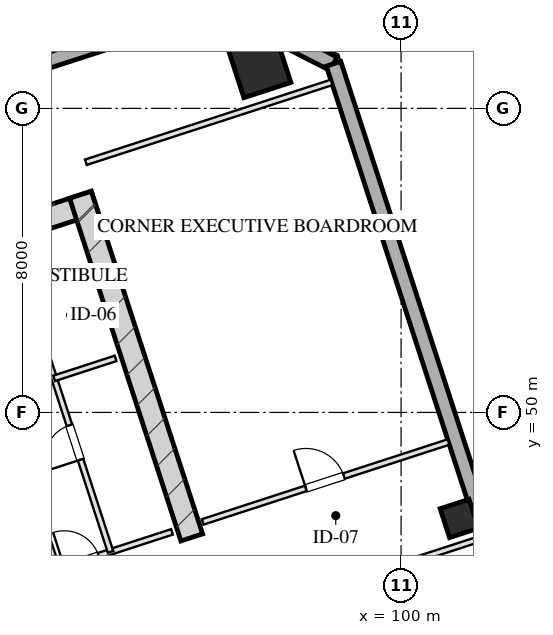
"""IFC4 building model, lengths in metres.
Left out: names, types, materials, properties, quantities, classifications, styles, units other than length and angle.
Written with IfcOpenShell. Run it as: python <this file> out.ifc"""

import sys

from ifc_helpers import new_model, si_unit, direction, frame, frame_2d, origin, origin_2d, place, context, subcontext, project, spatial, rectangle, hollow_rectangle, extrude, element, fill, save


model = new_model("IFC4")
c1 = context("Model", 3, precision=1e-05, world=origin(), true_north=direction((0.0, 1.0)))
c2 = subcontext(c1, "Body", "Model", "MODEL_VIEW")
j1 = project(units=[si_unit("LENGTHUNIT", "METRE"), si_unit("PLANEANGLEUNIT", "RADIAN")], contexts=[c1])
p1 = place(None, origin())
s1 = spatial("IfcSite", under=j1, at=p1, CompositionType="ELEMENT")
p2 = place(p1, origin())
s2 = spatial("IfcBuilding", under=s1, at=p2, CompositionType="ELEMENT")
p3 = place(p2, frame((0.0, 0.0, 170.2)))
s3 = spatial("IfcBuildingStorey", under=s2, at=p3, CompositionType="ELEMENT", Elevation=170.2)
p4 = place(p3, frame((76.344, 50.466, 0.0), z_axis=(0.0, 0.0, 1.0), x_axis=(0.951055727519, 0.309019421968, 0.0)))
e1 = element("IfcWall", 1, at=p4, inside=s3, PredefinedType="SHEAR", context=c2, shape_type="SweptSolid", body=[
    extrude(rectangle(XDim=16.4, YDim=0.6, at=frame_2d((8.2, 0.0))), origin(), (0.0, 0.0, 1.0), 3.45),
])
p5 = place(p3, frame((94.492, 46.71, 0.0), z_axis=(0.0, 0.0, 1.0), x_axis=(-0.309010370028, 0.95105866865, 0.0)))
e2 = element("IfcWall", 2, at=p5, inside=s3, PredefinedType="SHEAR", context=c2, shape_type="SweptSolid", body=[
    extrude(rectangle(XDim=9.48, YDim=0.6, at=frame_2d((4.74, 0.0))), origin(), (0.0, 0.0, 1.0), 3.45),
])
p6 = place(p3, frame((96.281, 59.099, 0.0), z_axis=(0.0, 0.0, 1.0), x_axis=(0.951056516295, 0.309016994375, 0.0)))
e3 = element("IfcColumn", 3, at=p6, inside=s3, PredefinedType="COLUMN", context=c2, shape_type="SweptSolid", body=[
    extrude(hollow_rectangle(XDim=1.3, YDim=1.3, WallThickness=0.045, at=origin_2d()), origin(), (0.0, 0.0, 1.0), 3.451),
])
p7 = place(p3, frame((101.532, 47.21, 0.0), z_axis=(0.0, 0.0, 1.0), x_axis=(0.951056516295, 0.309016994375, 0.0)))
e4 = element("IfcColumn", 4, at=p7, inside=s3, PredefinedType="COLUMN", context=c2, shape_type="SweptSolid", body=[
    extrude(hollow_rectangle(XDim=0.8, YDim=0.8, WallThickness=0.028, at=origin_2d()), origin(), (0.0, 0.0, 1.0), 3.451),
])
p8 = place(p3, frame((70.092, 52.556, 0.0), z_axis=(0.0, 0.0, 1.0), x_axis=(0.951057580055, 0.30901372044, 0.0)))
e5 = element("IfcWall", 5, at=p8, inside=s3, PredefinedType="SOLIDWALL", context=c2, shape_type="SweptSolid", body=[
    extrude(rectangle(XDim=26.4, YDim=0.4, at=frame_2d((13.2, 0.0))), origin(), (0.0, 0.0, 1.0), 2.61),
])
p9 = place(p3, frame((95.199, 60.714, 0.0), z_axis=(0.0, 0.0, 1.0), x_axis=(0.891020832027, -0.453962417932, 0.0)))
e6 = element("IfcWall", 6, at=p9, inside=s3, PredefinedType="SOLIDWALL", context=c2, shape_type="SweptSolid", body=[
    extrude(rectangle(XDim=3.394, YDim=0.4, at=frame_2d((1.697, 0.0))), origin(), (0.0, 0.0, 1.0), 2.61),
])
p10 = place(p3, frame((98.224, 59.173, 0.0), z_axis=(0.0, 0.0, 1.0), x_axis=(0.309014228706, -0.951057414911, 0.0)))
e7 = element("IfcWall", 7, at=p10, inside=s3, PredefinedType="SOLIDWALL", context=c2, shape_type="SweptSolid", body=[
    extrude(rectangle(XDim=42.8, YDim=0.4, at=frame_2d((21.4, 0.0))), origin(), (0.0, 0.0, 1.0), 2.61),
])
p11 = place(p10, frame((26.675, 0.0, 0.75)))
e8 = element("IfcOpeningElement", 8, at=p11, cuts=e7, PredefinedType="OPENING", context=c2, shape_type="SweptSolid", body=[
    extrude(rectangle(XDim=2.25, YDim=1.46, at=frame_2d((1.125, 0.73))), frame((0.0, 0.21, 0.0), z_axis=(0.0, -1.0, 0.0), x_axis=(1.0, 0.0, 0.0)), (0.0, 0.0, 1.0), 0.42),
])
p12 = place(p10, frame((22.875, 0.0, 0.75)))
e9 = element("IfcOpeningElement", 9, at=p12, cuts=e7, PredefinedType="OPENING", context=c2, shape_type="SweptSolid", body=[
    extrude(rectangle(XDim=2.25, YDim=1.46, at=frame_2d((1.125, 0.73))), frame((0.0, 0.21, 0.0), z_axis=(0.0, -1.0, 0.0), x_axis=(1.0, 0.0, 0.0)), (0.0, 0.0, 1.0), 0.42),
])
p13 = place(p10, frame((17.675, 0.0, 0.75)))
e10 = element("IfcOpeningElement", 10, at=p13, cuts=e7, PredefinedType="OPENING", context=c2, shape_type="SweptSolid", body=[
    extrude(rectangle(XDim=2.25, YDim=1.46, at=frame_2d((1.125, 0.73))), frame((0.0, 0.21, 0.0), z_axis=(0.0, -1.0, 0.0), x_axis=(1.0, 0.0, 0.0)), (0.0, 0.0, 1.0), 0.42),
])
p14 = place(p10, frame((13.875, 0.0, 0.75)))
e11 = element("IfcOpeningElement", 11, at=p14, cuts=e7, PredefinedType="OPENING", context=c2, shape_type="SweptSolid", body=[
    extrude(rectangle(XDim=2.25, YDim=1.46, at=frame_2d((1.125, 0.73))), frame((0.0, 0.21, 0.0), z_axis=(0.0, -1.0, 0.0), x_axis=(1.0, 0.0, 0.0)), (0.0, 0.0, 1.0), 0.42),
])
p15 = place(p3, frame((90.928, 45.868, 0.0), z_axis=(0.0, 0.0, 1.0), x_axis=(-0.309042196757, 0.951048327176, 0.0)))
e12 = element("IfcWall", 12, at=p15, inside=s3, PredefinedType="PARTITIONING", context=c2, shape_type="SweptSolid", body=[
    extrude(rectangle(XDim=8.43, YDim=0.2, at=frame_2d((4.215, 0.0))), origin(), (0.0, 0.0, 1.0), 3.175),
])
p16 = place(p3, frame((90.928, 45.868, 0.0), z_axis=(0.0, 0.0, 1.0), x_axis=(0.951059297078, 0.309008435874, 0.0)))
e13 = element("IfcWall", 13, at=p16, inside=s3, PredefinedType="PARTITIONING", context=c2, shape_type="SweptSolid", body=[
    extrude(rectangle(XDim=3.2, YDim=0.15, at=frame_2d((1.6, 0.0))), origin(), (0.0, 0.0, 1.0), 3.175),
])
p17 = place(p16, frame((0.22, 0.0, 0.0)))
e14 = element("IfcOpeningElement", 14, at=p17, cuts=e13, PredefinedType="OPENING", context=c2, shape_type="SweptSolid", body=[
    extrude(rectangle(XDim=0.95, YDim=2.05, at=frame_2d((0.475, 1.025))), frame((0.0, 0.085, 0.0), z_axis=(0.0, -1.0, 0.0), x_axis=(1.0, 0.0, 0.0)), (0.0, 0.0, 1.0), 0.17),
])
p18 = place(p3, frame((92.355, 46.331, 0.0), z_axis=(0.0, 0.0, 1.0), x_axis=(-0.309007490203, 0.951059604335, 0.0)))
e15 = element("IfcWall", 15, at=p18, inside=s3, PredefinedType="PARTITIONING", context=c2, shape_type="SweptSolid", body=[
    extrude(rectangle(XDim=8.43, YDim=0.15, at=frame_2d((4.215, 0.0))), origin(), (0.0, 0.0, 1.0), 3.175),
])
p19 = place(p18, frame((2.55, 0.0, 0.0)))
e16 = element("IfcOpeningElement", 16, at=p19, cuts=e15, PredefinedType="OPENING", context=c2, shape_type="SweptSolid", body=[
    extrude(rectangle(XDim=0.95, YDim=2.05, at=frame_2d((0.475, 1.025))), frame((0.0, 0.085, 0.0), z_axis=(0.0, -1.0, 0.0), x_axis=(1.0, 0.0, 0.0)), (0.0, 0.0, 1.0), 0.17),
])
p20 = place(p18, frame((5.8, 0.0, 0.0)))
e17 = element("IfcOpeningElement", 17, at=p20, cuts=e15, PredefinedType="OPENING", context=c2, shape_type="SweptSolid", body=[
    extrude(rectangle(XDim=0.9, YDim=2.05, at=frame_2d((0.45, 1.025))), frame((0.0, 0.085, 0.0), z_axis=(0.0, -1.0, 0.0), x_axis=(1.0, 0.0, 0.0)), (0.0, 0.0, 1.0), 0.17),
])
p21 = place(p3, frame((90.871, 50.896, 0.0), z_axis=(0.0, 0.0, 1.0), x_axis=(0.951054116971, 0.309024378638, 0.0)))
e18 = element("IfcWall", 18, at=p21, inside=s3, PredefinedType="PARTITIONING", context=c2, shape_type="SweptSolid", body=[
    extrude(rectangle(XDim=1.7, YDim=0.15, at=frame_2d((0.85, 0.0))), origin(), (0.0, 0.0, 1.0), 3.175),
])
p22 = place(p3, frame((91.705, 56.582, 0.0), z_axis=(0.0, 0.0, 1.0), x_axis=(0.951057811516, 0.309013008068, 0.0)))
e19 = element("IfcWall", 19, at=p22, inside=s3, PredefinedType="PARTITIONING", context=c2, shape_type="SweptSolid", body=[
    extrude(rectangle(XDim=6.8, YDim=0.15, at=frame_2d((3.4, 0.0))), origin(), (0.0, 0.0, 1.0), 3.175),
])
p23 = place(p3, frame((94.78, 47.119, 0.0), z_axis=(0.0, 0.0, 1.0), x_axis=(0.951057811516, 0.309013008068, 0.0)))
e20 = element("IfcWall", 20, at=p23, inside=s3, PredefinedType="PARTITIONING", context=c2, shape_type="SweptSolid", body=[
    extrude(rectangle(XDim=6.8, YDim=0.15, at=frame_2d((3.4, 0.0))), origin(), (0.0, 0.0, 1.0), 3.175),
])
p24 = place(p23, frame((2.856, 0.0, 0.0)))
e21 = element("IfcOpeningElement", 21, at=p24, cuts=e20, PredefinedType="OPENING", context=c2, shape_type="SweptSolid", body=[
    extrude(rectangle(XDim=1.05, YDim=2.05, at=frame_2d((0.525, 1.025))), frame((0.0, 0.085, 0.0), z_axis=(0.0, -1.0, 0.0), x_axis=(1.0, 0.0, 0.0)), (0.0, 0.0, 1.0), 0.17),
])
p25 = place(p3, frame((91.138, 43.118, 0.0), z_axis=(0.0, 0.0, 1.0), x_axis=(0.951054972381, 0.309021746015, 0.0)))
e22 = element("IfcWall", 22, at=p25, inside=s3, PredefinedType="PARTITIONING", context=c2, shape_type="SweptSolid", body=[
    extrude(rectangle(XDim=11.5, YDim=0.15, at=frame_2d((5.75, 0.0))), origin(), (0.0, 0.0, 1.0), 3.175),
])
p26 = place(p17, origin())
e23 = element("IfcDoor", 23, at=p26, inside=s3, OperationType="SINGLE_SWING_LEFT", PredefinedType="DOOR", context=c2, shape_type="SweptSolid", body=[
    extrude(rectangle(XDim=0.95, YDim=2.05, at=frame_2d((0.475, 1.025))), frame((0.0, 0.025, 0.0), z_axis=(0.0, -1.0, 0.0), x_axis=(1.0, 0.0, 0.0)), (0.0, 0.0, 1.0), 0.05),
])
fill(e14, e23)
p27 = place(p19, origin())
e24 = element("IfcDoor", 24, at=p27, inside=s3, OperationType="SINGLE_SWING_LEFT", PredefinedType="DOOR", context=c2, shape_type="SweptSolid", body=[
    extrude(rectangle(XDim=0.95, YDim=2.05, at=frame_2d((0.475, 1.025))), frame((0.0, 0.025, 0.0), z_axis=(0.0, -1.0, 0.0), x_axis=(1.0, 0.0, 0.0)), (0.0, 0.0, 1.0), 0.05),
])
fill(e16, e24)
p28 = place(p24, origin())
e25 = element("IfcDoor", 25, at=p28, inside=s3, OperationType="SINGLE_SWING_LEFT", PredefinedType="DOOR", context=c2, shape_type="SweptSolid", body=[
    extrude(rectangle(XDim=1.05, YDim=2.05, at=frame_2d((0.525, 1.025))), frame((0.0, 0.025, 0.0), z_axis=(0.0, -1.0, 0.0), x_axis=(1.0, 0.0, 0.0)), (0.0, 0.0, 1.0), 0.05),
])
fill(e21, e25)
save(model, sys.argv[1])
